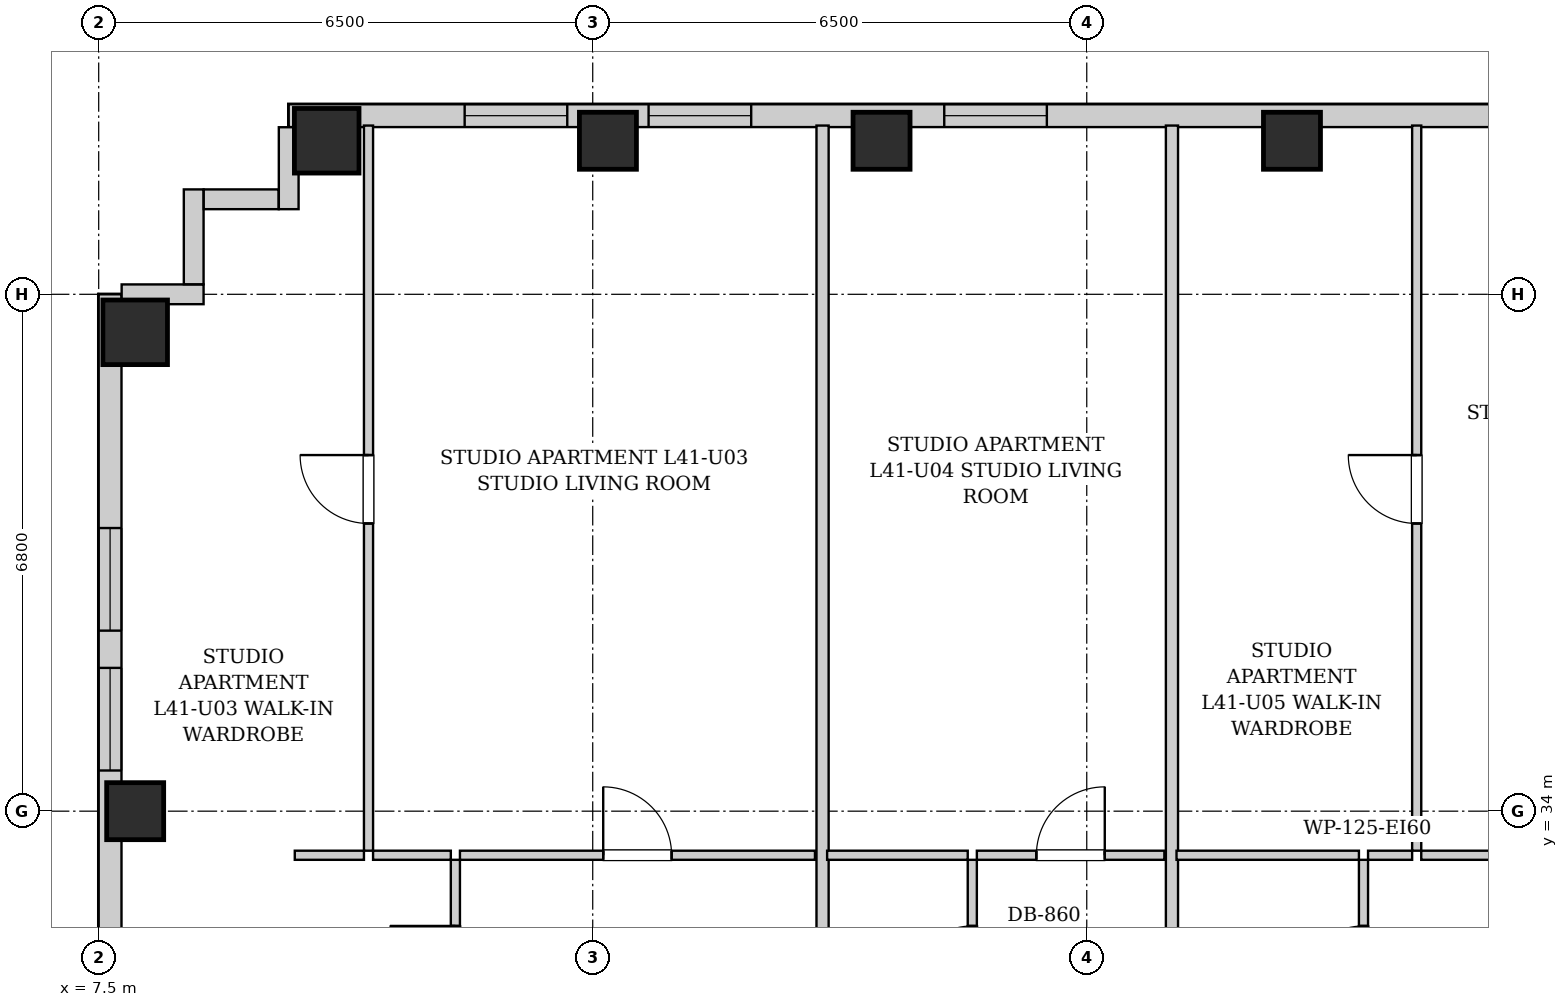
"""IFC4 building model, lengths in metres.
Left out: names, types, materials, properties, quantities, classifications, styles, units other than length and angle.
Written with IfcOpenShell. Run it as: python <this file> out.ifc"""

import sys

from ifc_helpers import new_model, si_unit, direction, frame, frame_2d, origin, origin_2d, place, context, subcontext, project, spatial, rectangle, extrude, element, fill, save


model = new_model("IFC4")
c1 = context("Model", 3, precision=1e-05, world=origin(), true_north=direction((0.0, 1.0)))
c2 = subcontext(c1, "Body", "Model", "MODEL_VIEW")
j1 = project(units=[si_unit("LENGTHUNIT", "METRE"), si_unit("PLANEANGLEUNIT", "RADIAN")], contexts=[c1])
p1 = place(None, origin())
s1 = spatial("IfcSite", under=j1, at=p1, CompositionType="ELEMENT")
p2 = place(p1, origin())
s2 = spatial("IfcBuilding", under=s1, at=p2, CompositionType="ELEMENT")
p3 = place(p2, frame((0.0, 0.0, 143.9)))
s3 = spatial("IfcBuildingStorey", under=s2, at=p3, CompositionType="ELEMENT", Elevation=143.9)
p4 = place(p3, frame((10.5, 42.82, 0.0), z_axis=(0.0, 0.0, 1.0), x_axis=(1.0, 0.0, 0.0)))
e1 = element("IfcColumn", 1, at=p4, inside=s3, PredefinedType="COLUMN", context=c2, shape_type="SweptSolid", body=[
    extrude(rectangle(XDim=0.85, YDim=0.85, at=origin_2d()), origin(), (0.0, 0.0, 1.0), 3.25),
])
for number, where, z_axis, x_axis in (
    (2, (14.2, 42.82, 0.0), (0.0, 0.0, 1.0), (1.0, 0.0, 0.0)),
    (3, (17.8, 42.82, 0.0), (0.0, 0.0, 1.0), (1.0, 0.0, 0.0)),
    (4, (23.2, 42.82, 0.0), (0.0, 0.0, 1.0), (1.0, 0.0, 0.0)),
    (5, (7.98, 34.0, 0.0), (0.0, 0.0, 1.0), (1.0, 0.0, 0.0)),
):
    element("IfcColumn", number, at=place(p3, frame(where, z_axis=z_axis, x_axis=x_axis)), inside=s3, PredefinedType="COLUMN", context=c2, shape_type="SweptSolid", body=[
        extrude(rectangle(XDim=0.75, YDim=0.75, at=origin_2d()), origin(), (0.0, 0.0, 1.0), 3.25),
    ])
p5 = place(p3, frame((7.98, 40.3, 0.0), z_axis=(0.0, 0.0, 1.0), x_axis=(1.0, 0.0, 0.0)))
e6 = element("IfcColumn", 6, at=p5, inside=s3, PredefinedType="COLUMN", context=c2, shape_type="SweptSolid", body=[
    extrude(rectangle(XDim=0.85, YDim=0.85, at=origin_2d()), origin(), (0.0, 0.0, 1.0), 3.25),
])
p6 = place(p3, frame((10.0, 43.15, 0.0), z_axis=(0.0, 0.0, 1.0), x_axis=(1.0, 0.0, 0.0)))
e7 = element("IfcWall", 7, at=p6, inside=s3, PredefinedType="SOLIDWALL", context=c2, shape_type="SweptSolid", body=[
    extrude(rectangle(XDim=19.5, YDim=0.3, at=frame_2d((9.75, 0.0))), origin(), (0.0, 0.0, 1.0), 2.99),
])
p7 = place(p6, frame((2.315, 0.0, 0.55)))
e8 = element("IfcOpeningElement", 8, at=p7, cuts=e7, PredefinedType="OPENING", context=c2, shape_type="SweptSolid", body=[
    extrude(rectangle(XDim=1.35, YDim=1.2, at=frame_2d((0.675, 0.6))), frame((0.0, 0.16, 0.0), z_axis=(0.0, -1.0, 0.0), x_axis=(1.0, 0.0, 0.0)), (0.0, 0.0, 1.0), 0.32),
])
p8 = place(p6, frame((4.735, 0.0, 0.55)))
e9 = element("IfcOpeningElement", 9, at=p8, cuts=e7, PredefinedType="OPENING", context=c2, shape_type="SweptSolid", body=[
    extrude(rectangle(XDim=1.35, YDim=1.2, at=frame_2d((0.675, 0.6))), frame((0.0, 0.16, 0.0), z_axis=(0.0, -1.0, 0.0), x_axis=(1.0, 0.0, 0.0)), (0.0, 0.0, 1.0), 0.32),
])
p9 = place(p6, frame((8.625, 0.0, 0.55)))
e10 = element("IfcOpeningElement", 10, at=p9, cuts=e7, PredefinedType="OPENING", context=c2, shape_type="SweptSolid", body=[
    extrude(rectangle(XDim=1.35, YDim=1.2, at=frame_2d((0.675, 0.6))), frame((0.0, 0.16, 0.0), z_axis=(0.0, -1.0, 0.0), x_axis=(1.0, 0.0, 0.0)), (0.0, 0.0, 1.0), 0.32),
])
p10 = place(p6, frame((17.5, 0.0, 0.55)))
e11 = element("IfcOpeningElement", 11, at=p10, cuts=e7, PredefinedType="OPENING", context=c2, shape_type="SweptSolid", body=[
    extrude(rectangle(XDim=1.35, YDim=1.2, at=frame_2d((0.675, 0.6))), frame((0.0, 0.16, 0.0), z_axis=(0.0, -1.0, 0.0), x_axis=(1.0, 0.0, 0.0)), (0.0, 0.0, 1.0), 0.32),
])
p11 = place(p3, frame((7.65, 6.3, 0.0), z_axis=(0.0, 0.0, 1.0), x_axis=(0.0, 1.0, 0.0)))
e12 = element("IfcWall", 12, at=p11, inside=s3, PredefinedType="SOLIDWALL", context=c2, shape_type="SweptSolid", body=[
    extrude(rectangle(XDim=34.5, YDim=0.3, at=frame_2d((17.25, 0.0))), origin(), (0.0, 0.0, 1.0), 2.99),
])
p12 = place(p11, frame((1.575, 0.0, 0.55)))
e13 = element("IfcOpeningElement", 13, at=p12, cuts=e12, PredefinedType="OPENING", context=c2, shape_type="SweptSolid", body=[
    extrude(rectangle(XDim=1.35, YDim=1.2, at=frame_2d((0.675, 0.6))), frame((0.0, 0.16, 0.0), z_axis=(0.0, -1.0, 0.0), x_axis=(1.0, 0.0, 0.0)), (0.0, 0.0, 1.0), 0.32),
])
p13 = place(p11, frame((30.075, 0.0, 0.55)))
e14 = element("IfcOpeningElement", 14, at=p13, cuts=e12, PredefinedType="OPENING", context=c2, shape_type="SweptSolid", body=[
    extrude(rectangle(XDim=1.35, YDim=1.2, at=frame_2d((0.675, 0.6))), frame((0.0, 0.16, 0.0), z_axis=(0.0, -1.0, 0.0), x_axis=(1.0, 0.0, 0.0)), (0.0, 0.0, 1.0), 0.32),
])
p14 = place(p11, frame((28.235, 0.0, 0.55)))
e15 = element("IfcOpeningElement", 15, at=p14, cuts=e12, PredefinedType="OPENING", context=c2, shape_type="SweptSolid", body=[
    extrude(rectangle(XDim=1.35, YDim=1.2, at=frame_2d((0.675, 0.6))), frame((0.0, 0.16, 0.0), z_axis=(0.0, -1.0, 0.0), x_axis=(1.0, 0.0, 0.0)), (0.0, 0.0, 1.0), 0.32),
])
p15 = place(p11, frame((11.175, 0.0, 0.55)))
e16 = element("IfcOpeningElement", 16, at=p15, cuts=e12, PredefinedType="OPENING", context=c2, shape_type="SweptSolid", body=[
    extrude(rectangle(XDim=1.35, YDim=1.2, at=frame_2d((0.675, 0.6))), frame((0.0, 0.16, 0.0), z_axis=(0.0, -1.0, 0.0), x_axis=(1.0, 0.0, 0.0)), (0.0, 0.0, 1.0), 0.32),
])
p16 = place(p11, frame((9.235, 0.0, 0.55)))
e17 = element("IfcOpeningElement", 17, at=p16, cuts=e12, PredefinedType="OPENING", context=c2, shape_type="SweptSolid", body=[
    extrude(rectangle(XDim=1.35, YDim=1.2, at=frame_2d((0.675, 0.6))), frame((0.0, 0.16, 0.0), z_axis=(0.0, -1.0, 0.0), x_axis=(1.0, 0.0, 0.0)), (0.0, 0.0, 1.0), 0.32),
])
p17 = place(p11, frame((18.2, 0.0, 0.55)))
e18 = element("IfcOpeningElement", 18, at=p17, cuts=e12, PredefinedType="OPENING", context=c2, shape_type="SweptSolid", body=[
    extrude(rectangle(XDim=1.35, YDim=1.2, at=frame_2d((0.675, 0.6))), frame((0.0, 0.16, 0.0), z_axis=(0.0, -1.0, 0.0), x_axis=(1.0, 0.0, 0.0)), (0.0, 0.0, 1.0), 0.32),
])
p18 = place(p11, frame((19.81, 0.0, 0.55)))
e19 = element("IfcOpeningElement", 19, at=p18, cuts=e12, PredefinedType="OPENING", context=c2, shape_type="SweptSolid", body=[
    extrude(rectangle(XDim=1.35, YDim=1.2, at=frame_2d((0.675, 0.6))), frame((0.0, 0.16, 0.0), z_axis=(0.0, -1.0, 0.0), x_axis=(1.0, 0.0, 0.0)), (0.0, 0.0, 1.0), 0.32),
])
p19 = place(p3, frame((7.802, 40.8, 0.0), z_axis=(0.0, 0.0, 1.0), x_axis=(1.0, 0.0, 0.0)))
e20 = element("IfcWall", 20, at=p19, inside=s3, PredefinedType="SOLIDWALL", context=c2, shape_type="SweptSolid", body=[
    extrude(rectangle(XDim=1.078, YDim=0.26, at=frame_2d((0.539, 0.0))), origin(), (0.0, 0.0, 1.0), 2.99),
])
p20 = place(p3, frame((8.75, 40.932, 0.0), z_axis=(0.0, 0.0, 1.0), x_axis=(0.0, 1.0, 0.0)))
e21 = element("IfcWall", 21, at=p20, inside=s3, PredefinedType="SOLIDWALL", context=c2, shape_type="SweptSolid", body=[
    extrude(rectangle(XDim=1.248, YDim=0.26, at=frame_2d((0.624, 0.0))), origin(), (0.0, 0.0, 1.0), 2.99),
])
p21 = place(p3, frame((8.882, 42.05, 0.0), z_axis=(0.0, 0.0, 1.0), x_axis=(1.0, 0.0, 0.0)))
e22 = element("IfcWall", 22, at=p21, inside=s3, PredefinedType="SOLIDWALL", context=c2, shape_type="SweptSolid", body=[
    extrude(rectangle(XDim=0.986, YDim=0.26, at=frame_2d((0.493, 0.0))), origin(), (0.0, 0.0, 1.0), 2.99),
])
p22 = place(p3, frame((10.0, 41.92, 0.0), z_axis=(0.0, 0.0, 1.0), x_axis=(0.0, 1.0, 0.0)))
e23 = element("IfcWall", 23, at=p22, inside=s3, PredefinedType="SOLIDWALL", context=c2, shape_type="SweptSolid", body=[
    extrude(rectangle(XDim=1.078, YDim=0.26, at=frame_2d((0.539, 0.0))), origin(), (0.0, 0.0, 1.0), 2.99),
])
p23 = place(p3, frame((12.193, 30.76, 0.0), z_axis=(0.0, 0.0, 1.0), x_axis=(0.0, 1.0, 0.0)))
e24 = element("IfcWall", 24, at=p23, inside=s3, PredefinedType="PARTITIONING", context=c2, shape_type="SweptSolid", body=[
    extrude(rectangle(XDim=2.6, YDim=0.12, at=frame_2d((1.3, 0.0))), origin(), (0.0, 0.0, 1.0), 2.99),
])
p24 = place(p23, frame((0.87, 0.0, 0.0)))
e25 = element("IfcOpeningElement", 25, at=p24, cuts=e24, PredefinedType="OPENING", context=c2, shape_type="SweptSolid", body=[
    extrude(rectangle(XDim=0.86, YDim=2.05, at=frame_2d((0.43, 1.025))), frame((0.0, 0.07, 0.0), z_axis=(0.0, -1.0, 0.0), x_axis=(1.0, 0.0, 0.0)), (0.0, 0.0, 1.0), 0.14),
])
p25 = place(p3, frame((10.08, 33.42, 0.0), z_axis=(0.0, 0.0, 1.0), x_axis=(1.0, 0.0, 0.0)))
e26 = element("IfcWall", 26, at=p25, inside=s3, PredefinedType="PARTITIONING", context=c2, shape_type="SweptSolid", body=[
    extrude(rectangle(XDim=0.91, YDim=0.12, at=frame_2d((0.455, 0.0))), origin(), (0.0, 0.0, 1.0), 2.99),
])
p26 = place(p3, frame((11.11, 33.42, 0.0), z_axis=(0.0, 0.0, 1.0), x_axis=(1.0, 0.0, 0.0)))
e27 = element("IfcWall", 27, at=p26, inside=s3, PredefinedType="PARTITIONING", context=c2, shape_type="SweptSolid", body=[
    extrude(rectangle(XDim=1.023, YDim=0.12, at=frame_2d((0.511, 0.0))), origin(), (0.0, 0.0, 1.0), 2.99),
])
p27 = place(p3, frame((12.253, 33.42, 0.0), z_axis=(0.0, 0.0, 1.0), x_axis=(1.0, 0.0, 0.0)))
e28 = element("IfcWall", 28, at=p27, inside=s3, PredefinedType="PARTITIONING", context=c2, shape_type="SweptSolid", body=[
    extrude(rectangle(XDim=4.671, YDim=0.12, at=frame_2d((2.335, 0.0))), origin(), (0.0, 0.0, 1.0), 2.99),
])
p28 = place(p27, frame((1.885, 0.0, 0.0)))
e29 = element("IfcOpeningElement", 29, at=p28, cuts=e28, PredefinedType="OPENING", context=c2, shape_type="SweptSolid", body=[
    extrude(rectangle(XDim=0.9, YDim=2.05, at=frame_2d((0.45, 1.025))), frame((0.0, 0.07, 0.0), z_axis=(0.0, -1.0, 0.0), x_axis=(1.0, 0.0, 0.0)), (0.0, 0.0, 1.0), 0.14),
])
p29 = place(p3, frame((11.05, 33.48, 0.0), z_axis=(0.0, 0.0, 1.0), x_axis=(0.0, 1.0, 0.0)))
e30 = element("IfcWall", 30, at=p29, inside=s3, PredefinedType="PARTITIONING", context=c2, shape_type="SweptSolid", body=[
    extrude(rectangle(XDim=9.54, YDim=0.12, at=frame_2d((4.77, 0.0))), origin(), (0.0, 0.0, 1.0), 2.99),
])
p30 = place(p29, frame((4.305, 0.0, 0.0)))
e31 = element("IfcOpeningElement", 31, at=p30, cuts=e30, PredefinedType="OPENING", context=c2, shape_type="SweptSolid", body=[
    extrude(rectangle(XDim=0.9, YDim=2.05, at=frame_2d((0.45, 1.025))), frame((0.0, 0.07, 0.0), z_axis=(0.0, -1.0, 0.0), x_axis=(1.0, 0.0, 0.0)), (0.0, 0.0, 1.0), 0.14),
])
p31 = place(p3, frame((17.024, 30.76, 0.0), z_axis=(0.0, 0.0, 1.0), x_axis=(0.0, 1.0, 0.0)))
e32 = element("IfcWall", 32, at=p31, inside=s3, PredefinedType="PARTITIONING", context=c2, shape_type="SweptSolid", body=[
    extrude(rectangle(XDim=12.26, YDim=0.16, at=frame_2d((6.13, 0.0))), origin(), (0.0, 0.0, 1.0), 2.99),
])
p32 = place(p3, frame((18.994, 30.76, 0.0), z_axis=(0.0, 0.0, 1.0), x_axis=(0.0, 1.0, 0.0)))
e33 = element("IfcWall", 33, at=p32, inside=s3, PredefinedType="PARTITIONING", context=c2, shape_type="SweptSolid", body=[
    extrude(rectangle(XDim=2.6, YDim=0.12, at=frame_2d((1.3, 0.0))), origin(), (0.0, 0.0, 1.0), 2.99),
])
p33 = place(p32, frame((0.87, 0.0, 0.0)))
e34 = element("IfcOpeningElement", 34, at=p33, cuts=e33, PredefinedType="OPENING", context=c2, shape_type="SweptSolid", body=[
    extrude(rectangle(XDim=0.86, YDim=2.05, at=frame_2d((0.43, 1.025))), frame((0.0, 0.07, 0.0), z_axis=(0.0, -1.0, 0.0), x_axis=(1.0, 0.0, 0.0)), (0.0, 0.0, 1.0), 0.14),
])
p34 = place(p3, frame((17.084, 33.42, 0.0), z_axis=(0.0, 0.0, 1.0), x_axis=(1.0, 0.0, 0.0)))
e35 = element("IfcWall", 35, at=p34, inside=s3, PredefinedType="PARTITIONING", context=c2, shape_type="SweptSolid", body=[
    extrude(rectangle(XDim=1.85, YDim=0.12, at=frame_2d((0.925, 0.0))), origin(), (0.0, 0.0, 1.0), 2.99),
])
p35 = place(p3, frame((19.054, 33.42, 0.0), z_axis=(0.0, 0.0, 1.0), x_axis=(1.0, 0.0, 0.0)))
e36 = element("IfcWall", 36, at=p35, inside=s3, PredefinedType="PARTITIONING", context=c2, shape_type="SweptSolid", body=[
    extrude(rectangle(XDim=2.467, YDim=0.12, at=frame_2d((1.233, 0.0))), origin(), (0.0, 0.0, 1.0), 2.99),
])
p36 = place(p35, frame((0.783, 0.0, 0.0)))
e37 = element("IfcOpeningElement", 37, at=p36, cuts=e36, PredefinedType="OPENING", context=c2, shape_type="SweptSolid", body=[
    extrude(rectangle(XDim=0.9, YDim=2.05, at=frame_2d((0.45, 1.025))), frame((0.0, 0.07, 0.0), z_axis=(0.0, -1.0, 0.0), x_axis=(1.0, 0.0, 0.0)), (0.0, 0.0, 1.0), 0.14),
])
p37 = place(p3, frame((21.621, 30.76, 0.0), z_axis=(0.0, 0.0, 1.0), x_axis=(0.0, 1.0, 0.0)))
e38 = element("IfcWall", 38, at=p37, inside=s3, PredefinedType="PARTITIONING", context=c2, shape_type="SweptSolid", body=[
    extrude(rectangle(XDim=12.26, YDim=0.16, at=frame_2d((6.13, 0.0))), origin(), (0.0, 0.0, 1.0), 2.99),
])
p38 = place(p3, frame((24.141, 30.76, 0.0), z_axis=(0.0, 0.0, 1.0), x_axis=(0.0, 1.0, 0.0)))
e39 = element("IfcWall", 39, at=p38, inside=s3, PredefinedType="PARTITIONING", context=c2, shape_type="SweptSolid", body=[
    extrude(rectangle(XDim=2.6, YDim=0.12, at=frame_2d((1.3, 0.0))), origin(), (0.0, 0.0, 1.0), 2.99),
])
p39 = place(p38, frame((0.87, 0.0, 0.0)))
e40 = element("IfcOpeningElement", 40, at=p39, cuts=e39, PredefinedType="OPENING", context=c2, shape_type="SweptSolid", body=[
    extrude(rectangle(XDim=0.86, YDim=2.05, at=frame_2d((0.43, 1.025))), frame((0.0, 0.07, 0.0), z_axis=(0.0, -1.0, 0.0), x_axis=(1.0, 0.0, 0.0)), (0.0, 0.0, 1.0), 0.14),
])
p40 = place(p3, frame((21.681, 33.42, 0.0), z_axis=(0.0, 0.0, 1.0), x_axis=(1.0, 0.0, 0.0)))
e41 = element("IfcWall", 41, at=p40, inside=s3, PredefinedType="PARTITIONING", context=c2, shape_type="SweptSolid", body=[
    extrude(rectangle(XDim=2.4, YDim=0.12, at=frame_2d((1.2, 0.0))), origin(), (0.0, 0.0, 1.0), 2.99),
])
p41 = place(p3, frame((24.201, 33.42, 0.0), z_axis=(0.0, 0.0, 1.0), x_axis=(1.0, 0.0, 0.0)))
e42 = element("IfcWall", 42, at=p41, inside=s3, PredefinedType="PARTITIONING", context=c2, shape_type="SweptSolid", body=[
    extrude(rectangle(XDim=0.58, YDim=0.12, at=frame_2d((0.29, 0.0))), origin(), (0.0, 0.0, 1.0), 2.99),
])
p42 = place(p3, frame((24.901, 33.42, 0.0), z_axis=(0.0, 0.0, 1.0), x_axis=(1.0, 0.0, 0.0)))
e43 = element("IfcWall", 43, at=p42, inside=s3, PredefinedType="PARTITIONING", context=c2, shape_type="SweptSolid", body=[
    extrude(rectangle(XDim=3.74, YDim=0.12, at=frame_2d((1.87, 0.0))), origin(), (0.0, 0.0, 1.0), 2.99),
])
p43 = place(p42, frame((1.42, 0.0, 0.0)))
e44 = element("IfcOpeningElement", 44, at=p43, cuts=e43, PredefinedType="OPENING", context=c2, shape_type="SweptSolid", body=[
    extrude(rectangle(XDim=0.9, YDim=2.05, at=frame_2d((0.45, 1.025))), frame((0.0, 0.07, 0.0), z_axis=(0.0, -1.0, 0.0), x_axis=(1.0, 0.0, 0.0)), (0.0, 0.0, 1.0), 0.14),
])
p44 = place(p3, frame((24.841, 33.48, 0.0), z_axis=(0.0, 0.0, 1.0), x_axis=(0.0, 1.0, 0.0)))
e45 = element("IfcWall", 45, at=p44, inside=s3, PredefinedType="PARTITIONING", context=c2, shape_type="SweptSolid", body=[
    extrude(rectangle(XDim=9.54, YDim=0.12, at=frame_2d((4.77, 0.0))), origin(), (0.0, 0.0, 1.0), 2.99),
])
p45 = place(p44, frame((4.305, 0.0, 0.0)))
e46 = element("IfcOpeningElement", 46, at=p45, cuts=e45, PredefinedType="OPENING", context=c2, shape_type="SweptSolid", body=[
    extrude(rectangle(XDim=0.9, YDim=2.05, at=frame_2d((0.45, 1.025))), frame((0.0, 0.07, 0.0), z_axis=(0.0, -1.0, 0.0), x_axis=(1.0, 0.0, 0.0)), (0.0, 0.0, 1.0), 0.14),
])
p46 = place(p24, origin())
e47 = element("IfcDoor", 47, at=p46, inside=s3, OperationType="SINGLE_SWING_RIGHT", PredefinedType="DOOR", context=c2, shape_type="SweptSolid", body=[
    extrude(rectangle(XDim=0.86, YDim=2.05, at=frame_2d((0.43, 1.025))), frame((0.0, 0.025, 0.0), z_axis=(0.0, -1.0, 0.0), x_axis=(1.0, 0.0, 0.0)), (0.0, 0.0, 1.0), 0.05),
])
fill(e25, e47)
p47 = place(p28, origin())
e48 = element("IfcDoor", 48, at=p47, inside=s3, OperationType="SINGLE_SWING_LEFT", PredefinedType="DOOR", context=c2, shape_type="SweptSolid", body=[
    extrude(rectangle(XDim=0.9, YDim=2.05, at=frame_2d((0.45, 1.025))), frame((0.0, 0.025, 0.0), z_axis=(0.0, -1.0, 0.0), x_axis=(1.0, 0.0, 0.0)), (0.0, 0.0, 1.0), 0.05),
])
fill(e29, e48)
p48 = place(p30, origin())
e49 = element("IfcDoor", 49, at=p48, inside=s3, OperationType="SINGLE_SWING_RIGHT", PredefinedType="DOOR", context=c2, shape_type="SweptSolid", body=[
    extrude(rectangle(XDim=0.9, YDim=2.05, at=frame_2d((0.45, 1.025))), frame((0.0, 0.025, 0.0), z_axis=(0.0, -1.0, 0.0), x_axis=(1.0, 0.0, 0.0)), (0.0, 0.0, 1.0), 0.05),
])
fill(e31, e49)
p49 = place(p33, origin())
e50 = element("IfcDoor", 50, at=p49, inside=s3, OperationType="SINGLE_SWING_LEFT", PredefinedType="DOOR", context=c2, shape_type="SweptSolid", body=[
    extrude(rectangle(XDim=0.86, YDim=2.05, at=frame_2d((0.43, 1.025))), frame((0.0, 0.025, 0.0), z_axis=(0.0, -1.0, 0.0), x_axis=(1.0, 0.0, 0.0)), (0.0, 0.0, 1.0), 0.05),
])
fill(e34, e50)
p50 = place(p36, origin())
e51 = element("IfcDoor", 51, at=p50, inside=s3, OperationType="SINGLE_SWING_RIGHT", PredefinedType="DOOR", context=c2, shape_type="SweptSolid", body=[
    extrude(rectangle(XDim=0.9, YDim=2.05, at=frame_2d((0.45, 1.025))), frame((0.0, 0.025, 0.0), z_axis=(0.0, -1.0, 0.0), x_axis=(1.0, 0.0, 0.0)), (0.0, 0.0, 1.0), 0.05),
])
fill(e37, e51)
p51 = place(p39, origin())
e52 = element("IfcDoor", 52, at=p51, inside=s3, OperationType="SINGLE_SWING_LEFT", PredefinedType="DOOR", context=c2, shape_type="SweptSolid", body=[
    extrude(rectangle(XDim=0.86, YDim=2.05, at=frame_2d((0.43, 1.025))), frame((0.0, 0.025, 0.0), z_axis=(0.0, -1.0, 0.0), x_axis=(1.0, 0.0, 0.0)), (0.0, 0.0, 1.0), 0.05),
])
fill(e40, e52)
p52 = place(p45, origin())
e53 = element("IfcDoor", 53, at=p52, inside=s3, OperationType="SINGLE_SWING_RIGHT", PredefinedType="DOOR", context=c2, shape_type="SweptSolid", body=[
    extrude(rectangle(XDim=0.9, YDim=2.05, at=frame_2d((0.45, 1.025))), frame((0.0, 0.025, 0.0), z_axis=(0.0, -1.0, 0.0), x_axis=(1.0, 0.0, 0.0)), (0.0, 0.0, 1.0), 0.05),
])
fill(e46, e53)
p53 = place(p13, origin())
e54 = element("IfcWindow", 54, at=p53, inside=s3, PartitioningType="SINGLE_PANEL", PredefinedType="WINDOW", context=c2, shape_type="SweptSolid", body=[
    extrude(rectangle(XDim=1.35, YDim=1.2, at=frame_2d((0.675, 0.6))), frame((0.0, 0.03, 0.0), z_axis=(0.0, -1.0, 0.0), x_axis=(1.0, 0.0, 0.0)), (0.0, 0.0, 1.0), 0.06),
])
fill(e14, e54)
p54 = place(p14, origin())
e55 = element("IfcWindow", 55, at=p54, inside=s3, PartitioningType="SINGLE_PANEL", PredefinedType="WINDOW", context=c2, shape_type="SweptSolid", body=[
    extrude(rectangle(XDim=1.35, YDim=1.2, at=frame_2d((0.675, 0.6))), frame((0.0, 0.03, 0.0), z_axis=(0.0, -1.0, 0.0), x_axis=(1.0, 0.0, 0.0)), (0.0, 0.0, 1.0), 0.06),
])
fill(e15, e55)
p55 = place(p7, origin())
e56 = element("IfcWindow", 56, at=p55, inside=s3, PartitioningType="SINGLE_PANEL", PredefinedType="WINDOW", context=c2, shape_type="SweptSolid", body=[
    extrude(rectangle(XDim=1.35, YDim=1.2, at=frame_2d((0.675, 0.6))), frame((0.0, 0.03, 0.0), z_axis=(0.0, -1.0, 0.0), x_axis=(1.0, 0.0, 0.0)), (0.0, 0.0, 1.0), 0.06),
])
fill(e8, e56)
p56 = place(p8, origin())
e57 = element("IfcWindow", 57, at=p56, inside=s3, PartitioningType="SINGLE_PANEL", PredefinedType="WINDOW", context=c2, shape_type="SweptSolid", body=[
    extrude(rectangle(XDim=1.35, YDim=1.2, at=frame_2d((0.675, 0.6))), frame((0.0, 0.03, 0.0), z_axis=(0.0, -1.0, 0.0), x_axis=(1.0, 0.0, 0.0)), (0.0, 0.0, 1.0), 0.06),
])
fill(e9, e57)
p57 = place(p9, origin())
e58 = element("IfcWindow", 58, at=p57, inside=s3, PartitioningType="SINGLE_PANEL", PredefinedType="WINDOW", context=c2, shape_type="SweptSolid", body=[
    extrude(rectangle(XDim=1.35, YDim=1.2, at=frame_2d((0.675, 0.6))), frame((0.0, 0.03, 0.0), z_axis=(0.0, -1.0, 0.0), x_axis=(1.0, 0.0, 0.0)), (0.0, 0.0, 1.0), 0.06),
])
fill(e10, e58)
save(model, sys.argv[1])
